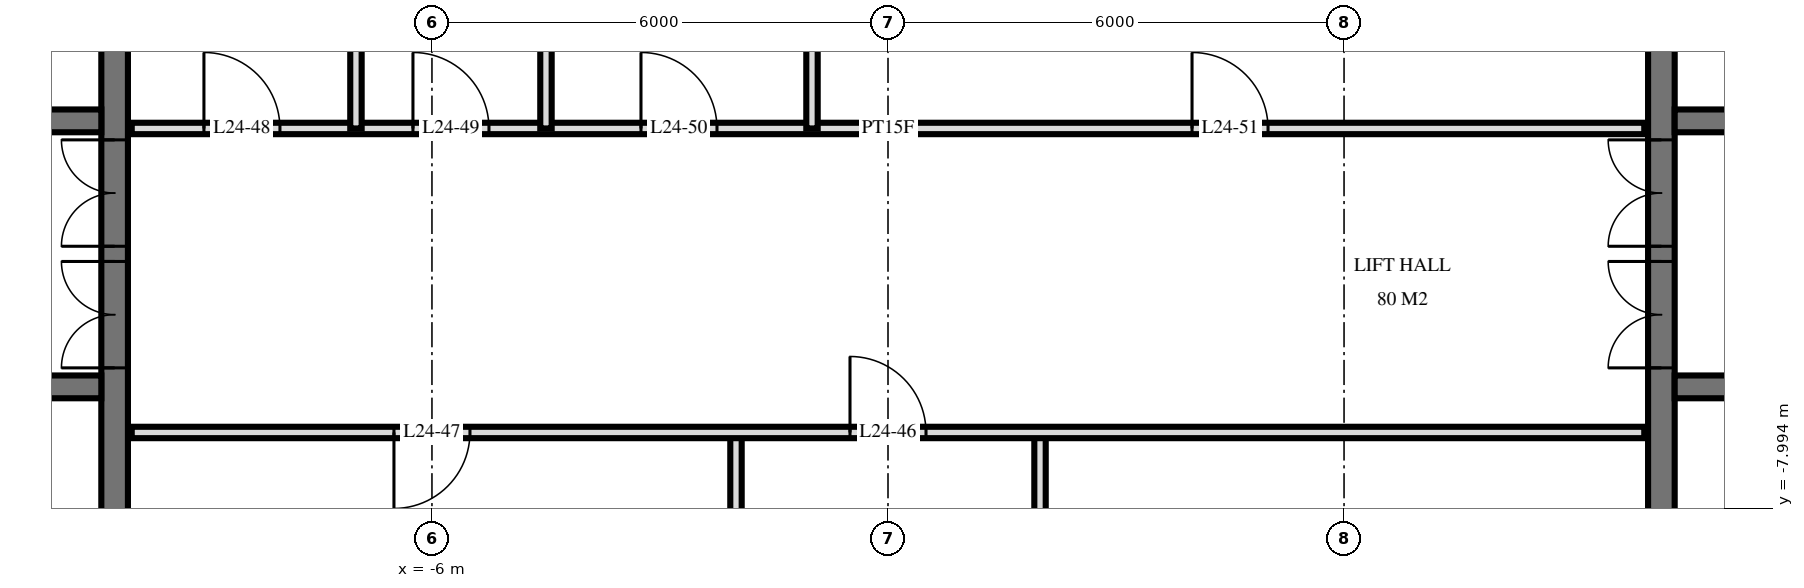
"""IFC4 building model, lengths in metres.
Left out: names, types, materials, properties, quantities, classifications, styles, units other than length and angle.
Written with IfcOpenShell. Run it as: python <this file> out.ifc"""

import sys

from ifc_helpers import new_model, si_unit, direction, frame, frame_2d, origin, place, context, subcontext, project, spatial, rectangle, extrude, element, fill, save


model = new_model("IFC4")
c1 = context("Model", 3, precision=1e-05, world=origin(), true_north=direction((0.0, 1.0)))
c2 = subcontext(c1, "Body", "Model", "MODEL_VIEW")
j1 = project(units=[si_unit("LENGTHUNIT", "METRE"), si_unit("PLANEANGLEUNIT", "RADIAN")], contexts=[c1])
p1 = place(None, origin())
s1 = spatial("IfcSite", under=j1, at=p1, CompositionType="ELEMENT")
p2 = place(p1, origin())
s2 = spatial("IfcBuilding", under=s1, at=p2, CompositionType="ELEMENT")
p3 = place(p2, frame((0.0, 0.0, 96.0)))
s3 = spatial("IfcBuildingStorey", under=s2, at=p3, CompositionType="ELEMENT", Elevation=96.0)
p4 = place(p3, frame((-10.175, -14.55, 0.0), z_axis=(0.0, 0.0, 1.0), x_axis=(0.0, 1.0, 0.0)))
e1 = element("IfcWall", 1, at=p4, inside=s3, PredefinedType="SHEAR", context=c2, shape_type="SweptSolid", body=[
    extrude(rectangle(XDim=14.1, YDim=0.35, at=frame_2d((7.05, 0.0))), origin(), (0.0, 0.0, 1.0), 3.6),
])
p5 = place(p4, frame((8.4, 0.0, 0.0)))
e2 = element("IfcOpeningElement", 2, at=p5, cuts=e1, PredefinedType="OPENING", context=c2, shape_type="SweptSolid", body=[
    extrude(rectangle(XDim=1.4, YDim=2.4, at=frame_2d((0.7, 1.2))), frame((0.0, 0.185, 0.0), z_axis=(0.0, -1.0, 0.0), x_axis=(1.0, 0.0, 0.0)), (0.0, 0.0, 1.0), 0.37),
])
p6 = place(p4, frame((10.0, 0.0, 0.0)))
e3 = element("IfcOpeningElement", 3, at=p6, cuts=e1, PredefinedType="OPENING", context=c2, shape_type="SweptSolid", body=[
    extrude(rectangle(XDim=1.4, YDim=2.4, at=frame_2d((0.7, 1.2))), frame((0.0, 0.185, 0.0), z_axis=(0.0, -1.0, 0.0), x_axis=(1.0, 0.0, 0.0)), (0.0, 0.0, 1.0), 0.37),
])
p7 = place(p4, frame((4.0, 0.0, 0.0)))
e4 = element("IfcOpeningElement", 4, at=p7, cuts=e1, PredefinedType="OPENING", context=c2, shape_type="SweptSolid", body=[
    extrude(rectangle(XDim=1.2, YDim=2.1, at=frame_2d((0.6, 1.05))), frame((0.0, 0.185, 0.0), z_axis=(0.0, -1.0, 0.0), x_axis=(1.0, 0.0, 0.0)), (0.0, 0.0, 1.0), 0.37),
])
p8 = place(p3, frame((-29.05, -2.9, 0.0), z_axis=(0.0, 0.0, 1.0), x_axis=(1.0, 0.0, 0.0)))
e5 = element("IfcWall", 5, at=p8, inside=s3, PredefinedType="SHEAR", context=c2, shape_type="SweptSolid", body=[
    extrude(rectangle(XDim=18.7, YDim=0.3, at=frame_2d((9.35, 0.0))), origin(), (0.0, 0.0, 1.0), 3.6),
])
p9 = place(p8, frame((2.95, 0.0, 0.0)))
e6 = element("IfcOpeningElement", 6, at=p9, cuts=e5, PredefinedType="OPENING", context=c2, shape_type="SweptSolid", body=[
    extrude(rectangle(XDim=1.1, YDim=2.1, at=frame_2d((0.55, 1.05))), frame((0.0, 0.16, 0.0), z_axis=(0.0, -1.0, 0.0), x_axis=(1.0, 0.0, 0.0)), (0.0, 0.0, 1.0), 0.32),
])
p10 = place(p8, frame((0.55, 0.0, 0.0)))
e7 = element("IfcOpeningElement", 7, at=p10, cuts=e5, PredefinedType="OPENING", context=c2, shape_type="SweptSolid", body=[
    extrude(rectangle(XDim=1.1, YDim=2.1, at=frame_2d((0.55, 1.05))), frame((0.0, 0.16, 0.0), z_axis=(0.0, -1.0, 0.0), x_axis=(1.0, 0.0, 0.0)), (0.0, 0.0, 1.0), 0.32),
])
p11 = place(p8, frame((10.9, 0.0, 0.0)))
e8 = element("IfcOpeningElement", 8, at=p11, cuts=e5, PredefinedType="OPENING", context=c2, shape_type="SweptSolid", body=[
    extrude(rectangle(XDim=0.9, YDim=2.1, at=frame_2d((0.45, 1.05))), frame((0.0, 0.16, 0.0), z_axis=(0.0, -1.0, 0.0), x_axis=(1.0, 0.0, 0.0)), (0.0, 0.0, 1.0), 0.32),
])
p12 = place(p8, frame((16.85, 0.0, 0.0)))
e9 = element("IfcOpeningElement", 9, at=p12, cuts=e5, PredefinedType="OPENING", context=c2, shape_type="SweptSolid", body=[
    extrude(rectangle(XDim=1.0, YDim=2.1, at=frame_2d((0.5, 1.05))), frame((0.0, 0.16, 0.0), z_axis=(0.0, -1.0, 0.0), x_axis=(1.0, 0.0, 0.0)), (0.0, 0.0, 1.0), 0.32),
])
p13 = place(p8, frame((13.85, 0.0, 0.0)))
e10 = element("IfcOpeningElement", 10, at=p13, cuts=e5, PredefinedType="OPENING", context=c2, shape_type="SweptSolid", body=[
    extrude(rectangle(XDim=1.0, YDim=2.1, at=frame_2d((0.5, 1.05))), frame((0.0, 0.16, 0.0), z_axis=(0.0, -1.0, 0.0), x_axis=(1.0, 0.0, 0.0)), (0.0, 0.0, 1.0), 0.32),
])
p14 = place(p8, frame((5.6, 0.0, 0.0)))
e11 = element("IfcOpeningElement", 11, at=p14, cuts=e5, PredefinedType="OPENING", context=c2, shape_type="SweptSolid", body=[
    extrude(rectangle(XDim=1.0, YDim=2.1, at=frame_2d((0.5, 1.05))), frame((0.0, 0.16, 0.0), z_axis=(0.0, -1.0, 0.0), x_axis=(1.0, 0.0, 0.0)), (0.0, 0.0, 1.0), 0.32),
])
p15 = place(p3, frame((-29.05, -6.4, 0.0), z_axis=(0.0, 0.0, 1.0), x_axis=(1.0, 0.0, 0.0)))
e12 = element("IfcWall", 12, at=p15, inside=s3, PredefinedType="SHEAR", context=c2, shape_type="SweptSolid", body=[
    extrude(rectangle(XDim=18.7, YDim=0.3, at=frame_2d((9.35, 0.0))), origin(), (0.0, 0.0, 1.0), 3.6),
])
p16 = place(p15, frame((2.95, 0.0, 0.0)))
e13 = element("IfcOpeningElement", 13, at=p16, cuts=e12, PredefinedType="OPENING", context=c2, shape_type="SweptSolid", body=[
    extrude(rectangle(XDim=1.1, YDim=2.1, at=frame_2d((0.55, 1.05))), frame((0.0, 0.16, 0.0), z_axis=(0.0, -1.0, 0.0), x_axis=(1.0, 0.0, 0.0)), (0.0, 0.0, 1.0), 0.32),
])
p17 = place(p15, frame((0.55, 0.0, 0.0)))
e14 = element("IfcOpeningElement", 14, at=p17, cuts=e12, PredefinedType="OPENING", context=c2, shape_type="SweptSolid", body=[
    extrude(rectangle(XDim=1.1, YDim=2.1, at=frame_2d((0.55, 1.05))), frame((0.0, 0.16, 0.0), z_axis=(0.0, -1.0, 0.0), x_axis=(1.0, 0.0, 0.0)), (0.0, 0.0, 1.0), 0.32),
])
p18 = place(p15, frame((10.8, 0.0, 0.0)))
e15 = element("IfcOpeningElement", 15, at=p18, cuts=e12, PredefinedType="OPENING", context=c2, shape_type="SweptSolid", body=[
    extrude(rectangle(XDim=1.1, YDim=2.1, at=frame_2d((0.55, 1.05))), frame((0.0, 0.16, 0.0), z_axis=(0.0, -1.0, 0.0), x_axis=(1.0, 0.0, 0.0)), (0.0, 0.0, 1.0), 0.32),
])
p19 = place(p15, frame((5.6, 0.0, 0.0)))
e16 = element("IfcOpeningElement", 16, at=p19, cuts=e12, PredefinedType="OPENING", context=c2, shape_type="SweptSolid", body=[
    extrude(rectangle(XDim=1.0, YDim=2.1, at=frame_2d((0.5, 1.05))), frame((0.0, 0.16, 0.0), z_axis=(0.0, -1.0, 0.0), x_axis=(1.0, 0.0, 0.0)), (0.0, 0.0, 1.0), 0.32),
])
p20 = place(p3, frame((10.175, -14.55, 0.0), z_axis=(0.0, 0.0, 1.0), x_axis=(0.0, 1.0, 0.0)))
e17 = element("IfcWall", 17, at=p20, inside=s3, PredefinedType="SHEAR", context=c2, shape_type="SweptSolid", body=[
    extrude(rectangle(XDim=14.1, YDim=0.35, at=frame_2d((7.05, 0.0))), origin(), (0.0, 0.0, 1.0), 3.6),
])
p21 = place(p20, frame((8.4, 0.0, 0.0)))
e18 = element("IfcOpeningElement", 18, at=p21, cuts=e17, PredefinedType="OPENING", context=c2, shape_type="SweptSolid", body=[
    extrude(rectangle(XDim=1.4, YDim=2.4, at=frame_2d((0.7, 1.2))), frame((0.0, 0.185, 0.0), z_axis=(0.0, -1.0, 0.0), x_axis=(1.0, 0.0, 0.0)), (0.0, 0.0, 1.0), 0.37),
])
p22 = place(p20, frame((10.0, 0.0, 0.0)))
e19 = element("IfcOpeningElement", 19, at=p22, cuts=e17, PredefinedType="OPENING", context=c2, shape_type="SweptSolid", body=[
    extrude(rectangle(XDim=1.4, YDim=2.4, at=frame_2d((0.7, 1.2))), frame((0.0, 0.185, 0.0), z_axis=(0.0, -1.0, 0.0), x_axis=(1.0, 0.0, 0.0)), (0.0, 0.0, 1.0), 0.37),
])
p23 = place(p20, frame((4.0, 0.0, 0.0)))
e20 = element("IfcOpeningElement", 20, at=p23, cuts=e17, PredefinedType="OPENING", context=c2, shape_type="SweptSolid", body=[
    extrude(rectangle(XDim=1.2, YDim=2.1, at=frame_2d((0.6, 1.05))), frame((0.0, 0.185, 0.0), z_axis=(0.0, -1.0, 0.0), x_axis=(1.0, 0.0, 0.0)), (0.0, 0.0, 1.0), 0.37),
])
p24 = place(p3, frame((10.35, -2.9, 0.0), z_axis=(0.0, 0.0, 1.0), x_axis=(1.0, 0.0, 0.0)))
e21 = element("IfcWall", 21, at=p24, inside=s3, PredefinedType="SHEAR", context=c2, shape_type="SweptSolid", body=[
    extrude(rectangle(XDim=18.7, YDim=0.3, at=frame_2d((9.35, 0.0))), origin(), (0.0, 0.0, 1.0), 3.6),
])
p25 = place(p24, frame((14.65, 0.0, 0.0)))
e22 = element("IfcOpeningElement", 22, at=p25, cuts=e21, PredefinedType="OPENING", context=c2, shape_type="SweptSolid", body=[
    extrude(rectangle(XDim=1.1, YDim=2.1, at=frame_2d((0.55, 1.05))), frame((0.0, 0.16, 0.0), z_axis=(0.0, -1.0, 0.0), x_axis=(1.0, 0.0, 0.0)), (0.0, 0.0, 1.0), 0.32),
])
p26 = place(p24, frame((17.05, 0.0, 0.0)))
e23 = element("IfcOpeningElement", 23, at=p26, cuts=e21, PredefinedType="OPENING", context=c2, shape_type="SweptSolid", body=[
    extrude(rectangle(XDim=1.1, YDim=2.1, at=frame_2d((0.55, 1.05))), frame((0.0, 0.16, 0.0), z_axis=(0.0, -1.0, 0.0), x_axis=(1.0, 0.0, 0.0)), (0.0, 0.0, 1.0), 0.32),
])
p27 = place(p24, frame((6.9, 0.0, 0.0)))
e24 = element("IfcOpeningElement", 24, at=p27, cuts=e21, PredefinedType="OPENING", context=c2, shape_type="SweptSolid", body=[
    extrude(rectangle(XDim=0.9, YDim=2.1, at=frame_2d((0.45, 1.05))), frame((0.0, 0.16, 0.0), z_axis=(0.0, -1.0, 0.0), x_axis=(1.0, 0.0, 0.0)), (0.0, 0.0, 1.0), 0.32),
])
p28 = place(p24, frame((0.85, 0.0, 0.0)))
e25 = element("IfcOpeningElement", 25, at=p28, cuts=e21, PredefinedType="OPENING", context=c2, shape_type="SweptSolid", body=[
    extrude(rectangle(XDim=1.0, YDim=2.1, at=frame_2d((0.5, 1.05))), frame((0.0, 0.16, 0.0), z_axis=(0.0, -1.0, 0.0), x_axis=(1.0, 0.0, 0.0)), (0.0, 0.0, 1.0), 0.32),
])
p29 = place(p24, frame((3.85, 0.0, 0.0)))
e26 = element("IfcOpeningElement", 26, at=p29, cuts=e21, PredefinedType="OPENING", context=c2, shape_type="SweptSolid", body=[
    extrude(rectangle(XDim=1.0, YDim=2.1, at=frame_2d((0.5, 1.05))), frame((0.0, 0.16, 0.0), z_axis=(0.0, -1.0, 0.0), x_axis=(1.0, 0.0, 0.0)), (0.0, 0.0, 1.0), 0.32),
])
p30 = place(p24, frame((12.1, 0.0, 0.0)))
e27 = element("IfcOpeningElement", 27, at=p30, cuts=e21, PredefinedType="OPENING", context=c2, shape_type="SweptSolid", body=[
    extrude(rectangle(XDim=1.0, YDim=2.1, at=frame_2d((0.5, 1.05))), frame((0.0, 0.16, 0.0), z_axis=(0.0, -1.0, 0.0), x_axis=(1.0, 0.0, 0.0)), (0.0, 0.0, 1.0), 0.32),
])
p31 = place(p3, frame((10.35, -6.4, 0.0), z_axis=(0.0, 0.0, 1.0), x_axis=(1.0, 0.0, 0.0)))
e28 = element("IfcWall", 28, at=p31, inside=s3, PredefinedType="SHEAR", context=c2, shape_type="SweptSolid", body=[
    extrude(rectangle(XDim=18.7, YDim=0.3, at=frame_2d((9.35, 0.0))), origin(), (0.0, 0.0, 1.0), 3.6),
])
p32 = place(p31, frame((14.65, 0.0, 0.0)))
e29 = element("IfcOpeningElement", 29, at=p32, cuts=e28, PredefinedType="OPENING", context=c2, shape_type="SweptSolid", body=[
    extrude(rectangle(XDim=1.1, YDim=2.1, at=frame_2d((0.55, 1.05))), frame((0.0, 0.16, 0.0), z_axis=(0.0, -1.0, 0.0), x_axis=(1.0, 0.0, 0.0)), (0.0, 0.0, 1.0), 0.32),
])
p33 = place(p31, frame((17.05, 0.0, 0.0)))
e30 = element("IfcOpeningElement", 30, at=p33, cuts=e28, PredefinedType="OPENING", context=c2, shape_type="SweptSolid", body=[
    extrude(rectangle(XDim=1.1, YDim=2.1, at=frame_2d((0.55, 1.05))), frame((0.0, 0.16, 0.0), z_axis=(0.0, -1.0, 0.0), x_axis=(1.0, 0.0, 0.0)), (0.0, 0.0, 1.0), 0.32),
])
p34 = place(p31, frame((6.8, 0.0, 0.0)))
e31 = element("IfcOpeningElement", 31, at=p34, cuts=e28, PredefinedType="OPENING", context=c2, shape_type="SweptSolid", body=[
    extrude(rectangle(XDim=1.1, YDim=2.1, at=frame_2d((0.55, 1.05))), frame((0.0, 0.16, 0.0), z_axis=(0.0, -1.0, 0.0), x_axis=(1.0, 0.0, 0.0)), (0.0, 0.0, 1.0), 0.32),
])
p35 = place(p31, frame((12.1, 0.0, 0.0)))
e32 = element("IfcOpeningElement", 32, at=p35, cuts=e28, PredefinedType="OPENING", context=c2, shape_type="SweptSolid", body=[
    extrude(rectangle(XDim=1.0, YDim=2.1, at=frame_2d((0.5, 1.05))), frame((0.0, 0.16, 0.0), z_axis=(0.0, -1.0, 0.0), x_axis=(1.0, 0.0, 0.0)), (0.0, 0.0, 1.0), 0.32),
])
p36 = place(p3, frame((2.0, -11.0, 0.0), z_axis=(0.0, 0.0, 1.0), x_axis=(0.0, 1.0, 0.0)))
e33 = element("IfcWall", 33, at=p36, inside=s3, PredefinedType="PARTITIONING", context=c2, shape_type="SweptSolid", body=[
    extrude(rectangle(XDim=4.0, YDim=0.15, at=frame_2d((2.0, 0.0))), origin(), (0.0, 0.0, 1.0), 3.32),
])
p37 = place(p3, frame((-1.0, -3.0, 0.0), z_axis=(0.0, 0.0, 1.0), x_axis=(0.0, 1.0, 0.0)))
e34 = element("IfcWall", 34, at=p37, inside=s3, PredefinedType="PARTITIONING", context=c2, shape_type="SweptSolid", body=[
    extrude(rectangle(XDim=4.02, YDim=0.15, at=frame_2d((2.01, 0.0))), origin(), (0.0, 0.0, 1.0), 3.32),
])
p38 = place(p3, frame((-2.0, -11.0, 0.0), z_axis=(0.0, 0.0, 1.0), x_axis=(0.0, 1.0, 0.0)))
e35 = element("IfcWall", 35, at=p38, inside=s3, PredefinedType="PARTITIONING", context=c2, shape_type="SweptSolid", body=[
    extrude(rectangle(XDim=4.0, YDim=0.15, at=frame_2d((2.0, 0.0))), origin(), (0.0, 0.0, 1.0), 3.32),
])
for number, where, z_axis, x_axis in (
    (36, (-4.5, -3.0, 0.0), (0.0, 0.0, 1.0), (0.0, 1.0, 0.0)),
    (37, (-7.0, -3.0, 0.0), (0.0, 0.0, 1.0), (0.0, 1.0, 0.0)),
):
    element("IfcWall", number, at=place(p3, frame(where, z_axis=z_axis, x_axis=x_axis)), inside=s3, PredefinedType="PLUMBINGWALL", context=c2, shape_type="SweptSolid", body=[
        extrude(rectangle(XDim=4.02, YDim=0.15, at=frame_2d((2.01, 0.0))), origin(), (0.0, 0.0, 1.0), 3.32),
    ])
p39 = place(p3, frame((-9.95, -7.0, 0.0), z_axis=(0.0, 0.0, 1.0), x_axis=(1.0, 0.0, 0.0)))
e38 = element("IfcWall", 38, at=p39, inside=s3, PredefinedType="PARTITIONING", context=c2, shape_type="SweptSolid", body=[
    extrude(rectangle(XDim=19.9, YDim=0.15, at=frame_2d((9.95, 0.0))), origin(), (0.0, 0.0, 1.0), 3.32),
])
p40 = place(p39, frame((9.45, 0.0, 0.0)))
e39 = element("IfcOpeningElement", 39, at=p40, cuts=e38, PredefinedType="OPENING", context=c2, shape_type="SweptSolid", body=[
    extrude(rectangle(XDim=1.0, YDim=2.1, at=frame_2d((0.5, 1.05))), frame((0.0, 0.085, 0.0), z_axis=(0.0, -1.0, 0.0), x_axis=(1.0, 0.0, 0.0)), (0.0, 0.0, 1.0), 0.17),
])
p41 = place(p39, frame((3.45, 0.0, 0.0)))
e40 = element("IfcOpeningElement", 40, at=p41, cuts=e38, PredefinedType="OPENING", context=c2, shape_type="SweptSolid", body=[
    extrude(rectangle(XDim=1.0, YDim=2.1, at=frame_2d((0.5, 1.05))), frame((0.0, 0.085, 0.0), z_axis=(0.0, -1.0, 0.0), x_axis=(1.0, 0.0, 0.0)), (0.0, 0.0, 1.0), 0.17),
])
p42 = place(p3, frame((-9.95, -3.0, 0.0), z_axis=(0.0, 0.0, 1.0), x_axis=(1.0, 0.0, 0.0)))
e41 = element("IfcWall", 41, at=p42, inside=s3, PredefinedType="PARTITIONING", context=c2, shape_type="SweptSolid", body=[
    extrude(rectangle(XDim=19.9, YDim=0.15, at=frame_2d((9.95, 0.0))), origin(), (0.0, 0.0, 1.0), 3.32),
])
p43 = place(p42, frame((0.95, 0.0, 0.0)))
e42 = element("IfcOpeningElement", 42, at=p43, cuts=e41, PredefinedType="OPENING", context=c2, shape_type="SweptSolid", body=[
    extrude(rectangle(XDim=1.0, YDim=2.1, at=frame_2d((0.5, 1.05))), frame((0.0, 0.085, 0.0), z_axis=(0.0, -1.0, 0.0), x_axis=(1.0, 0.0, 0.0)), (0.0, 0.0, 1.0), 0.17),
])
p44 = place(p42, frame((3.7, 0.0, 0.0)))
e43 = element("IfcOpeningElement", 43, at=p44, cuts=e41, PredefinedType="OPENING", context=c2, shape_type="SweptSolid", body=[
    extrude(rectangle(XDim=1.0, YDim=2.1, at=frame_2d((0.5, 1.05))), frame((0.0, 0.085, 0.0), z_axis=(0.0, -1.0, 0.0), x_axis=(1.0, 0.0, 0.0)), (0.0, 0.0, 1.0), 0.17),
])
p45 = place(p42, frame((6.7, 0.0, 0.0)))
e44 = element("IfcOpeningElement", 44, at=p45, cuts=e41, PredefinedType="OPENING", context=c2, shape_type="SweptSolid", body=[
    extrude(rectangle(XDim=1.0, YDim=2.1, at=frame_2d((0.5, 1.05))), frame((0.0, 0.085, 0.0), z_axis=(0.0, -1.0, 0.0), x_axis=(1.0, 0.0, 0.0)), (0.0, 0.0, 1.0), 0.17),
])
p46 = place(p42, frame((13.95, 0.0, 0.0)))
e45 = element("IfcOpeningElement", 45, at=p46, cuts=e41, PredefinedType="OPENING", context=c2, shape_type="SweptSolid", body=[
    extrude(rectangle(XDim=1.0, YDim=2.1, at=frame_2d((0.5, 1.05))), frame((0.0, 0.085, 0.0), z_axis=(0.0, -1.0, 0.0), x_axis=(1.0, 0.0, 0.0)), (0.0, 0.0, 1.0), 0.17),
])
p47 = place(p5, origin())
e46 = element("IfcDoor", 46, at=p47, inside=s3, OperationType="DOUBLE_DOOR_SINGLE_SWING", PredefinedType="DOOR", context=c2, shape_type="SweptSolid", body=[
    extrude(rectangle(XDim=1.4, YDim=2.4, at=frame_2d((0.7, 1.2))), frame((0.0, 0.025, 0.0), z_axis=(0.0, -1.0, 0.0), x_axis=(1.0, 0.0, 0.0)), (0.0, 0.0, 1.0), 0.05),
])
fill(e2, e46)
p48 = place(p6, origin())
e47 = element("IfcDoor", 47, at=p48, inside=s3, OperationType="DOUBLE_DOOR_SINGLE_SWING", PredefinedType="DOOR", context=c2, shape_type="SweptSolid", body=[
    extrude(rectangle(XDim=1.4, YDim=2.4, at=frame_2d((0.7, 1.2))), frame((0.0, 0.025, 0.0), z_axis=(0.0, -1.0, 0.0), x_axis=(1.0, 0.0, 0.0)), (0.0, 0.0, 1.0), 0.05),
])
fill(e3, e47)
p49 = place(p21, origin())
e48 = element("IfcDoor", 48, at=p49, inside=s3, OperationType="DOUBLE_DOOR_SINGLE_SWING", PredefinedType="DOOR", context=c2, shape_type="SweptSolid", body=[
    extrude(rectangle(XDim=1.4, YDim=2.4, at=frame_2d((0.7, 1.2))), frame((0.0, 0.025, 0.0), z_axis=(0.0, -1.0, 0.0), x_axis=(1.0, 0.0, 0.0)), (0.0, 0.0, 1.0), 0.05),
])
fill(e18, e48)
p50 = place(p22, origin())
e49 = element("IfcDoor", 49, at=p50, inside=s3, OperationType="DOUBLE_DOOR_SINGLE_SWING", PredefinedType="DOOR", context=c2, shape_type="SweptSolid", body=[
    extrude(rectangle(XDim=1.4, YDim=2.4, at=frame_2d((0.7, 1.2))), frame((0.0, 0.025, 0.0), z_axis=(0.0, -1.0, 0.0), x_axis=(1.0, 0.0, 0.0)), (0.0, 0.0, 1.0), 0.05),
])
fill(e19, e49)
p51 = place(p40, origin())
e50 = element("IfcDoor", 50, at=p51, inside=s3, OperationType="SINGLE_SWING_RIGHT", PredefinedType="DOOR", context=c2, shape_type="SweptSolid", body=[
    extrude(rectangle(XDim=1.0, YDim=2.1, at=frame_2d((0.5, 1.05))), frame((0.0, 0.025, 0.0), z_axis=(0.0, -1.0, 0.0), x_axis=(1.0, 0.0, 0.0)), (0.0, 0.0, 1.0), 0.05),
])
fill(e39, e50)
p52 = place(p41, frame((0.5, 0.0, 0.0), z_axis=(0.0, 0.0, 1.0), x_axis=(-1.0, 0.0, 0.0)))
e51 = element("IfcDoor", 51, at=p52, inside=s3, OperationType="SINGLE_SWING_LEFT", PredefinedType="DOOR", context=c2, shape_type="SweptSolid", body=[
    extrude(rectangle(XDim=1.0, YDim=2.1, at=frame_2d((0.0, 1.05))), frame((0.0, -0.025, 0.0), z_axis=(0.0, 1.0, 0.0), x_axis=(-1.0, 0.0, 0.0)), (0.0, 0.0, 1.0), 0.05),
])
fill(e40, e51)
p53 = place(p43, origin())
e52 = element("IfcDoor", 52, at=p53, inside=s3, OperationType="SINGLE_SWING_RIGHT", PredefinedType="DOOR", context=c2, shape_type="SweptSolid", body=[
    extrude(rectangle(XDim=1.0, YDim=2.1, at=frame_2d((0.5, 1.05))), frame((0.0, 0.025, 0.0), z_axis=(0.0, -1.0, 0.0), x_axis=(1.0, 0.0, 0.0)), (0.0, 0.0, 1.0), 0.05),
])
fill(e42, e52)
p54 = place(p44, origin())
e53 = element("IfcDoor", 53, at=p54, inside=s3, OperationType="SINGLE_SWING_RIGHT", PredefinedType="DOOR", context=c2, shape_type="SweptSolid", body=[
    extrude(rectangle(XDim=1.0, YDim=2.1, at=frame_2d((0.5, 1.05))), frame((0.0, 0.025, 0.0), z_axis=(0.0, -1.0, 0.0), x_axis=(1.0, 0.0, 0.0)), (0.0, 0.0, 1.0), 0.05),
])
fill(e43, e53)
p55 = place(p45, origin())
e54 = element("IfcDoor", 54, at=p55, inside=s3, OperationType="SINGLE_SWING_RIGHT", PredefinedType="DOOR", context=c2, shape_type="SweptSolid", body=[
    extrude(rectangle(XDim=1.0, YDim=2.1, at=frame_2d((0.5, 1.05))), frame((0.0, 0.025, 0.0), z_axis=(0.0, -1.0, 0.0), x_axis=(1.0, 0.0, 0.0)), (0.0, 0.0, 1.0), 0.05),
])
fill(e44, e54)
p56 = place(p46, origin())
e55 = element("IfcDoor", 55, at=p56, inside=s3, OperationType="SINGLE_SWING_RIGHT", PredefinedType="DOOR", context=c2, shape_type="SweptSolid", body=[
    extrude(rectangle(XDim=1.0, YDim=2.1, at=frame_2d((0.5, 1.05))), frame((0.0, 0.025, 0.0), z_axis=(0.0, -1.0, 0.0), x_axis=(1.0, 0.0, 0.0)), (0.0, 0.0, 1.0), 0.05),
])
fill(e45, e55)
save(model, sys.argv[1])
